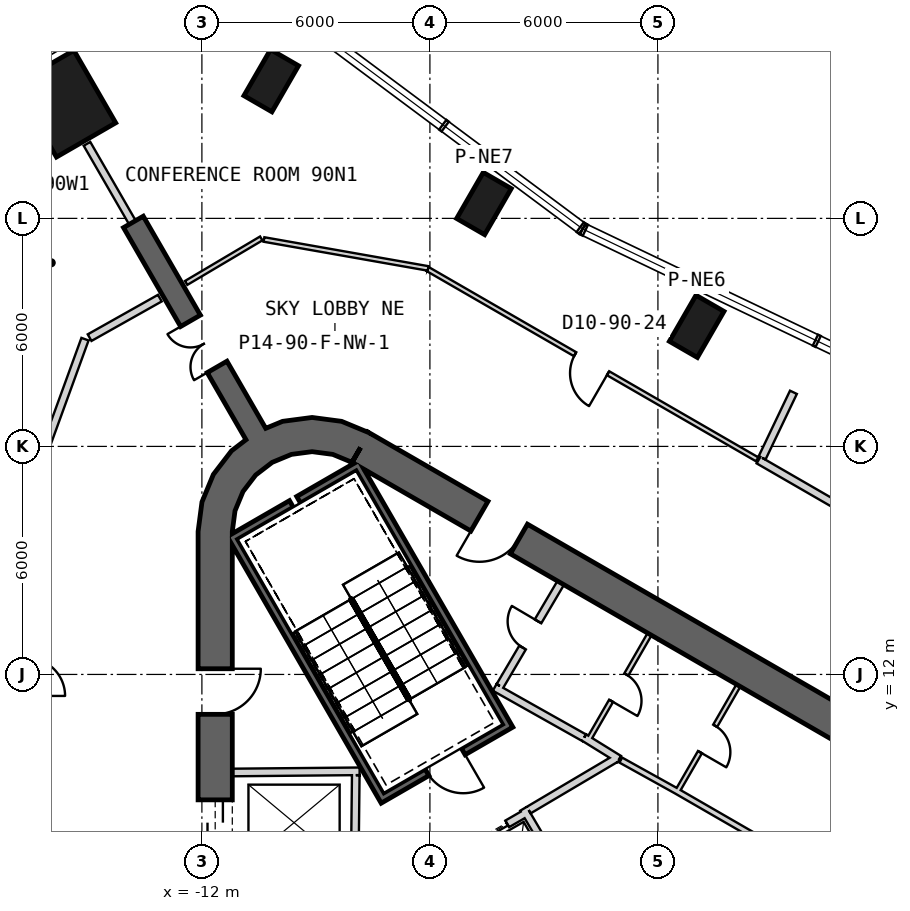
"""IFC4 building model, lengths in metres.
Left out: names, types, materials, properties, quantities, classifications, styles, units other than length and angle.
Written with IfcOpenShell. Run it as: python <this file> out.ifc"""

import sys

from ifc_helpers import new_model, si_unit, direction, frame, frame_2d, origin, origin_2d, place, context, subcontext, project, spatial, polyline, rectangle, outline, extrude, element, fill, save


model = new_model("IFC4")
c1 = context("Model", 3, precision=1e-05, world=origin(), true_north=direction((0.0, 1.0)))
c2 = subcontext(c1, "Body", "Model", "MODEL_VIEW")
j1 = project(units=[si_unit("LENGTHUNIT", "METRE"), si_unit("PLANEANGLEUNIT", "RADIAN")], contexts=[c1])
p1 = place(None, origin())
s1 = spatial("IfcSite", under=j1, at=p1, CompositionType="ELEMENT")
p2 = place(p1, origin())
s2 = spatial("IfcBuilding", under=s1, at=p2, CompositionType="ELEMENT")
p3 = place(p2, frame((0.0, 0.0, 392.3)))
s3 = spatial("IfcBuildingStorey", under=s2, at=p3, CompositionType="ELEMENT", Elevation=392.3)
p4 = place(p3, frame((-15.598, 27.016, 0.0), z_axis=(0.0, 0.0, 1.0), x_axis=(-0.5, 0.866025403784, 0.0)))
e1 = element("IfcColumn", 1, at=p4, inside=s3, PredefinedType="COLUMN", context=c2, shape_type="SweptSolid", body=[
    extrude(rectangle(XDim=2.2, YDim=1.8, at=origin_2d()), origin(), (0.0, 0.0, 1.0), 5.7),
])
for number, where, z_axis, x_axis in (
    (2, (1.02, 21.159, 0.0), (0.0, 0.0, 1.0), (0.5, 0.866, 0.0)),
    (3, (-4.578, 24.391, 0.0), (0.0, 0.0, 1.0), (0.5, 0.866, 0.0)),
    (4, (-10.176, 27.623, 0.0), (0.0, 0.0, 1.0), (0.5, 0.866, 0.0)),
):
    element("IfcColumn", number, at=place(p3, frame(where, z_axis=z_axis, x_axis=x_axis)), inside=s3, PredefinedType="COLUMN", context=c2, shape_type="SweptSolid", body=[
        extrude(rectangle(XDim=1.4, YDim=0.85, at=origin_2d()), origin(), (0.0, 0.0, 1.0), 5.7),
    ])
p5 = place(p3, frame((19.475, 2.208, 0.0), z_axis=(0.0, 0.0, 1.0), x_axis=(-0.866028369851, 0.499994862586, 0.0)))
e5 = element("IfcWall", 5, at=p5, inside=s3, PredefinedType="SHEAR", context=c2, shape_type="SweptSolid", body=[
    extrude(rectangle(XDim=31.523, YDim=0.9, at=frame_2d((15.762, 0.0))), origin(), (0.0, 0.0, 1.0), 6.0),
])
p6 = place(p5, frame((7.062, 0.0, 0.0)))
e6 = element("IfcOpeningElement", 6, at=p6, cuts=e5, PredefinedType="OPENING", context=c2, shape_type="SweptSolid", body=[
    extrude(rectangle(XDim=1.2, YDim=2.4, at=frame_2d((0.6, 1.2))), frame((0.0, 0.46, 0.0), z_axis=(0.0, -1.0, 0.0), x_axis=(1.0, 0.0, 0.0)), (0.0, 0.0, 1.0), 0.92),
])
p7 = place(p5, frame((3.612, 0.0, 0.0)))
e7 = element("IfcOpeningElement", 7, at=p7, cuts=e5, PredefinedType="OPENING", context=c2, shape_type="SweptSolid", body=[
    extrude(rectangle(XDim=1.2, YDim=2.4, at=frame_2d((0.6, 1.2))), frame((0.0, 0.46, 0.0), z_axis=(0.0, -1.0, 0.0), x_axis=(1.0, 0.0, 0.0)), (0.0, 0.0, 1.0), 0.92),
])
p8 = place(p5, frame((26.712, 0.0, 0.0)))
e8 = element("IfcOpeningElement", 8, at=p8, cuts=e5, PredefinedType="OPENING", context=c2, shape_type="SweptSolid", body=[
    extrude(rectangle(XDim=1.2, YDim=2.4, at=frame_2d((0.6, 1.2))), frame((0.0, 0.46, 0.0), z_axis=(0.0, -1.0, 0.0), x_axis=(1.0, 0.0, 0.0)), (0.0, 0.0, 1.0), 0.92),
])
p9 = place(p3, frame((-11.65, 15.762, 0.0), z_axis=(0.0, 0.0, 1.0), x_axis=(0.0, -1.0, 0.0)))
e9 = element("IfcWall", 9, at=p9, inside=s3, PredefinedType="SHEAR", context=c2, shape_type="SweptSolid", body=[
    extrude(rectangle(XDim=31.523, YDim=0.9, at=frame_2d((15.762, 0.0))), origin(), (0.0, 0.0, 1.0), 6.0),
])
p10 = place(p9, frame((7.062, 0.0, 0.0)))
e10 = element("IfcOpeningElement", 10, at=p10, cuts=e9, PredefinedType="OPENING", context=c2, shape_type="SweptSolid", body=[
    extrude(rectangle(XDim=1.2, YDim=2.4, at=frame_2d((0.6, 1.2))), frame((0.0, 0.46, 0.0), z_axis=(0.0, -1.0, 0.0), x_axis=(1.0, 0.0, 0.0)), (0.0, 0.0, 1.0), 0.92),
])
p11 = place(p9, frame((9.762, 0.0, 0.0)))
e11 = element("IfcOpeningElement", 11, at=p11, cuts=e9, PredefinedType="OPENING", context=c2, shape_type="SweptSolid", body=[
    extrude(rectangle(XDim=1.2, YDim=2.4, at=frame_2d((0.6, 1.2))), frame((0.0, 0.46, 0.0), z_axis=(0.0, -1.0, 0.0), x_axis=(1.0, 0.0, 0.0)), (0.0, 0.0, 1.0), 0.92),
])
p12 = place(p9, frame((12.462, 0.0, 0.0)))
e12 = element("IfcOpeningElement", 12, at=p12, cuts=e9, PredefinedType="OPENING", context=c2, shape_type="SweptSolid", body=[
    extrude(rectangle(XDim=1.2, YDim=2.4, at=frame_2d((0.6, 1.2))), frame((0.0, 0.46, 0.0), z_axis=(0.0, -1.0, 0.0), x_axis=(1.0, 0.0, 0.0)), (0.0, 0.0, 1.0), 0.92),
])
p13 = place(p9, frame((15.162, 0.0, 0.0)))
e13 = element("IfcOpeningElement", 13, at=p13, cuts=e9, PredefinedType="OPENING", context=c2, shape_type="SweptSolid", body=[
    extrude(rectangle(XDim=1.2, YDim=2.4, at=frame_2d((0.6, 1.2))), frame((0.0, 0.46, 0.0), z_axis=(0.0, -1.0, 0.0), x_axis=(1.0, 0.0, 0.0)), (0.0, 0.0, 1.0), 0.92),
])
p14 = place(p9, frame((17.862, 0.0, 0.0)))
e14 = element("IfcOpeningElement", 14, at=p14, cuts=e9, PredefinedType="OPENING", context=c2, shape_type="SweptSolid", body=[
    extrude(rectangle(XDim=1.2, YDim=2.4, at=frame_2d((0.6, 1.2))), frame((0.0, 0.46, 0.0), z_axis=(0.0, -1.0, 0.0), x_axis=(1.0, 0.0, 0.0)), (0.0, 0.0, 1.0), 0.92),
])
p15 = place(p9, frame((20.562, 0.0, 0.0)))
e15 = element("IfcOpeningElement", 15, at=p15, cuts=e9, PredefinedType="OPENING", context=c2, shape_type="SweptSolid", body=[
    extrude(rectangle(XDim=1.2, YDim=2.4, at=frame_2d((0.6, 1.2))), frame((0.0, 0.46, 0.0), z_axis=(0.0, -1.0, 0.0), x_axis=(1.0, 0.0, 0.0)), (0.0, 0.0, 1.0), 0.92),
])
p16 = place(p9, frame((23.262, 0.0, 0.0)))
e16 = element("IfcOpeningElement", 16, at=p16, cuts=e9, PredefinedType="OPENING", context=c2, shape_type="SweptSolid", body=[
    extrude(rectangle(XDim=1.2, YDim=2.4, at=frame_2d((0.6, 1.2))), frame((0.0, 0.46, 0.0), z_axis=(0.0, -1.0, 0.0), x_axis=(1.0, 0.0, 0.0)), (0.0, 0.0, 1.0), 0.92),
])
p17 = place(p9, frame((3.612, 0.0, 0.0)))
e17 = element("IfcOpeningElement", 17, at=p17, cuts=e9, PredefinedType="OPENING", context=c2, shape_type="SweptSolid", body=[
    extrude(rectangle(XDim=1.2, YDim=2.4, at=frame_2d((0.6, 1.2))), frame((0.0, 0.46, 0.0), z_axis=(0.0, -1.0, 0.0), x_axis=(1.0, 0.0, 0.0)), (0.0, 0.0, 1.0), 0.92),
])
p18 = place(p9, frame((26.712, 0.0, 0.0)))
e18 = element("IfcOpeningElement", 18, at=p18, cuts=e9, PredefinedType="OPENING", context=c2, shape_type="SweptSolid", body=[
    extrude(rectangle(XDim=1.2, YDim=2.4, at=frame_2d((0.6, 1.2))), frame((0.0, 0.46, 0.0), z_axis=(0.0, -1.0, 0.0), x_axis=(1.0, 0.0, 0.0)), (0.0, 0.0, 1.0), 0.92),
])
p19 = place(p3, origin())
e19 = element("IfcWall", 19, at=p19, inside=s3, PredefinedType="SHEAR", context=c2, shape_type="SweptSolid", body=[
    extrude(outline(polyline([(-7.6, 18.36), (-8.323, 18.659), (-9.1, 18.762), (-9.876, 18.659), (-10.6, 18.36), (-11.221, 17.883), (-11.698, 17.262), (-11.998, 16.538), (-12.1, 15.762), (-11.2, 15.762), (-11.128, 16.305), (-10.919, 16.812), (-10.585, 17.247), (-10.15, 17.58), (-9.644, 17.79), (-9.1, 17.862), (-8.556, 17.79), (-8.05, 17.58), (-7.6, 18.36)])), origin(), (0.0, 0.0, 1.0), 6.0),
])
p20 = place(p3, frame((-10.575, 18.316, 0.0), z_axis=(0.0, 0.0, 1.0), x_axis=(-0.500011655475, 0.866018674388, 0.0)))
e20 = element("IfcWall", 20, at=p20, inside=s3, PredefinedType="SHEAR", context=c2, shape_type="SweptSolid", body=[
    extrude(rectangle(XDim=6.455, YDim=0.6, at=frame_2d((3.228, 0.0))), origin(), (0.0, 0.0, 1.0), 6.0),
])
p21 = place(p20, frame((2.05, 0.0, 0.0)))
e21 = element("IfcOpeningElement", 21, at=p21, cuts=e20, PredefinedType="OPENING", context=c2, shape_type="SweptSolid", body=[
    extrude(rectangle(XDim=1.4, YDim=2.4, at=frame_2d((0.7, 1.2))), frame((0.0, 0.31, 0.0), z_axis=(0.0, -1.0, 0.0), x_axis=(1.0, 0.0, 0.0)), (0.0, 0.0, 1.0), 0.62),
])
p22 = place(p3, frame((-11.2, 9.42, 0.0), z_axis=(0.0, 0.0, 1.0), x_axis=(0.999957167047, 0.009255488683, 0.0)))
e22 = element("IfcWall", 22, at=p22, inside=s3, PredefinedType="PLUMBINGWALL", context=c2, shape_type="SweptSolid", body=[
    extrude(rectangle(XDim=3.35, YDim=0.2, at=frame_2d((1.675, 0.0))), origin(), (0.0, 0.0, 1.0), 5.7),
])
p23 = place(p3, frame((-7.951, 9.35, 0.0), z_axis=(0.0, 0.0, 1.0), x_axis=(-0.011120469654, -0.999938165666, 0.0)))
e23 = element("IfcWall", 23, at=p23, inside=s3, PredefinedType="PLUMBINGWALL", context=c2, shape_type="SweptSolid", body=[
    extrude(rectangle(XDim=2.7, YDim=0.2, at=frame_2d((1.35, 0.0))), origin(), (0.0, 0.0, 1.0), 5.7),
])
p24 = place(p3, frame((-11.245, 15.678, -0.35), z_axis=(0.0, 0.0, 1.0), x_axis=(0.499977274689, -0.866038523851, 0.0)))
e24 = element("IfcWall", 24, at=p24, inside=s3, PredefinedType="SHEAR", context=c2, shape_type="SweptSolid", body=[
    extrude(rectangle(XDim=8.1, YDim=0.2, at=frame_2d((4.05, 0.0))), origin(), (0.0, 0.0, 1.0), 6.05),
])
p25 = place(p3, frame((-7.818, 17.541, -0.35), z_axis=(0.0, 0.0, 1.0), x_axis=(-0.866088799389, -0.499890179513, 0.0)))
e25 = element("IfcWall", 25, at=p25, inside=s3, PredefinedType="SHEAR", context=c2, shape_type="SweptSolid", body=[
    extrude(rectangle(XDim=1.89, YDim=0.2, at=frame_2d((0.945, 0.0))), origin(), (0.0, 0.0, 1.0), 6.05),
])
p26 = place(p3, frame((-9.645, 16.486, -0.35), z_axis=(0.0, 0.0, 1.0), x_axis=(-0.866038843867, -0.499976720371, 0.0)))
e26 = element("IfcWall", 26, at=p26, inside=s3, PredefinedType="SHEAR", context=c2, shape_type="SweptSolid", body=[
    extrude(rectangle(XDim=1.69, YDim=0.2, at=frame_2d((0.845, 0.0))), origin(), (0.0, 0.0, 1.0), 6.05),
])
p27 = place(p3, frame((-7.854, 17.405, -0.35), z_axis=(0.0, 0.0, 1.0), x_axis=(0.499997992926, -0.866026562566, 0.0)))
e27 = element("IfcWall", 27, at=p27, inside=s3, PredefinedType="SHEAR", context=c2, shape_type="SweptSolid", body=[
    extrude(rectangle(XDim=7.9, YDim=0.2, at=frame_2d((3.95, 0.0))), origin(), (0.0, 0.0, 1.0), 6.05),
])
p28 = place(p3, frame((-7.159, 8.8, -0.35), z_axis=(0.0, 0.0, 1.0), x_axis=(0.866047807691, 0.499961193289, 0.0)))
e28 = element("IfcWall", 28, at=p28, inside=s3, PredefinedType="SHEAR", context=c2, shape_type="SweptSolid", body=[
    extrude(rectangle(XDim=3.6, YDim=0.2, at=frame_2d((1.8, 0.0))), origin(), (0.0, 0.0, 1.0), 6.05),
])
p29 = place(p28, frame((1.25, 0.0, 0.35)))
e29 = element("IfcOpeningElement", 29, at=p29, cuts=e28, PredefinedType="OPENING", context=c2, shape_type="SweptSolid", body=[
    extrude(rectangle(XDim=1.1, YDim=2.1, at=frame_2d((0.55, 1.05))), frame((0.0, 0.11, 0.0), z_axis=(0.0, -1.0, 0.0), x_axis=(1.0, 0.0, 0.0)), (0.0, 0.0, 1.0), 0.22),
])
p30 = place(p3, frame((-5.524, 7.168, 0.0), z_axis=(0.0, 0.0, 1.0), x_axis=(0.866024647952, 0.500001309137, 0.0)))
e30 = element("IfcWall", 30, at=p30, inside=s3, PredefinedType="PLUMBINGWALL", context=c2, shape_type="SweptSolid", body=[
    extrude(rectangle(XDim=2.4, YDim=0.2, at=frame_2d((1.2, 0.0))), origin(), (0.0, 0.0, 1.0), 5.7),
])
p31 = place(p30, frame((0.6, 0.0, 0.0)))
e31 = element("IfcOpeningElement", 31, at=p31, cuts=e30, PredefinedType="OPENING", context=c2, shape_type="SweptSolid", body=[
    extrude(rectangle(XDim=1.2, YDim=2.4, at=frame_2d((0.6, 1.2))), frame((0.0, 0.11, 0.0), z_axis=(0.0, -1.0, 0.0), x_axis=(1.0, 0.0, 0.0)), (0.0, 0.0, 1.0), 0.22),
])
p32 = place(p3, frame((-3.538, 8.465, 0.0), z_axis=(0.0, 0.0, 1.0), x_axis=(0.508647062354, -0.860975125052, 0.0)))
e32 = element("IfcWall", 32, at=p32, inside=s3, PredefinedType="PLUMBINGWALL", context=c2, shape_type="SweptSolid", body=[
    extrude(rectangle(XDim=3.1, YDim=0.2, at=frame_2d((1.55, 0.0))), origin(), (0.0, 0.0, 1.0), 5.7),
])
p33 = place(p3, frame((2.119, 11.709, 0.0), z_axis=(0.0, 0.0, 1.0), x_axis=(-0.500017246033, -0.866015446554, 0.0)))
e33 = element("IfcWall", 33, at=p33, inside=s3, PredefinedType="PARTITIONING", context=c2, shape_type="SweptSolid", body=[
    extrude(rectangle(XDim=3.25, YDim=0.12, at=frame_2d((1.625, 0.0))), origin(), (0.0, 0.0, 1.0), 5.7),
])
p34 = place(p33, frame((1.225, 0.0, 0.0)))
e34 = element("IfcOpeningElement", 34, at=p34, cuts=e33, PredefinedType="OPENING", context=c2, shape_type="SweptSolid", body=[
    extrude(rectangle(XDim=0.8, YDim=2.1, at=frame_2d((0.4, 1.05))), frame((0.0, 0.07, 0.0), z_axis=(0.0, -1.0, 0.0), x_axis=(1.0, 0.0, 0.0)), (0.0, 0.0, 1.0), 0.14),
])
p35 = place(p3, frame((5.159, 6.236, 0.0), z_axis=(0.0, 0.0, 1.0), x_axis=(-0.866028230842, 0.499995103361, 0.0)))
e35 = element("IfcWall", 35, at=p35, inside=s3, PredefinedType="PLUMBINGWALL", context=c2, shape_type="SweptSolid", body=[
    extrude(rectangle(XDim=5.4, YDim=0.15, at=frame_2d((2.7, 0.0))), origin(), (0.0, 0.0, 1.0), 5.7),
])
p36 = place(p35, frame((2.3, 0.0, 0.0)))
e36 = element("IfcOpeningElement", 36, at=p36, cuts=e35, PredefinedType="OPENING", context=c2, shape_type="SweptSolid", body=[
    extrude(rectangle(XDim=0.8, YDim=2.1, at=frame_2d((0.4, 1.05))), frame((0.0, 0.085, 0.0), z_axis=(0.0, -1.0, 0.0), x_axis=(1.0, 0.0, 0.0)), (0.0, 0.0, 1.0), 0.17),
])
p37 = place(p3, frame((-0.22, 13.06, 0.0), z_axis=(0.0, 0.0, 1.0), x_axis=(-0.499984717929, -0.866034226713, 0.0)))
e37 = element("IfcWall", 37, at=p37, inside=s3, PredefinedType="PARTITIONING", context=c2, shape_type="SweptSolid", body=[
    extrude(rectangle(XDim=3.25, YDim=0.12, at=frame_2d((1.625, 0.0))), origin(), (0.0, 0.0, 1.0), 5.7),
])
p38 = place(p37, frame((1.225, 0.0, 0.0)))
e38 = element("IfcOpeningElement", 38, at=p38, cuts=e37, PredefinedType="OPENING", context=c2, shape_type="SweptSolid", body=[
    extrude(rectangle(XDim=0.8, YDim=2.1, at=frame_2d((0.4, 1.05))), frame((0.0, 0.07, 0.0), z_axis=(0.0, -1.0, 0.0), x_axis=(1.0, 0.0, 0.0)), (0.0, 0.0, 1.0), 0.14),
])
p39 = place(p3, frame((-1.941, 10.339, 0.0), z_axis=(0.0, 0.0, 1.0), x_axis=(0.850216889117, -0.526432561171, 0.0)))
e39 = element("IfcWall", 39, at=p39, inside=s3, PredefinedType="PARTITIONING", context=c2, shape_type="SweptSolid", body=[
    extrude(rectangle(XDim=1.078, YDim=0.2, at=frame_2d((0.539, 0.0))), origin(), (0.0, 0.0, 1.0), 5.7),
])
p40 = place(p3, frame((0.483, 8.936, 0.0), z_axis=(0.0, 0.0, 1.0), x_axis=(-0.874315691004, 0.485357674776, 0.0)))
e40 = element("IfcWall", 40, at=p40, inside=s3, PredefinedType="PLUMBINGWALL", context=c2, shape_type="SweptSolid", body=[
    extrude(rectangle(XDim=1.671, YDim=0.15, at=frame_2d((0.836, 0.0))), origin(), (0.0, 0.0, 1.0), 5.7),
])
p41 = place(p3, frame((-4.296, 11.659, 0.0), z_axis=(0.0, 0.0, 1.0), x_axis=(0.871534483978, -0.490334215854, 0.0)))
e41 = element("IfcWall", 41, at=p41, inside=s3, PredefinedType="PARTITIONING", context=c2, shape_type="SweptSolid", body=[
    extrude(rectangle(XDim=2.7, YDim=0.2, at=frame_2d((1.35, 0.0))), origin(), (0.0, 0.0, 1.0), 5.7),
])
p42 = place(p3, frame((-2.558, 14.409, 0.0), z_axis=(0.0, 0.0, 1.0), x_axis=(-0.508018930956, -0.861345903683, 0.0)))
e42 = element("IfcWall", 42, at=p42, inside=s3, PredefinedType="PARTITIONING", context=c2, shape_type="SweptSolid", body=[
    extrude(rectangle(XDim=3.15, YDim=0.2, at=frame_2d((1.575, 0.0))), origin(), (0.0, 0.0, 1.0), 5.7),
])
p43 = place(p42, frame((1.175, 0.0, 0.0)))
e43 = element("IfcOpeningElement", 43, at=p43, cuts=e42, PredefinedType="OPENING", context=c2, shape_type="SweptSolid", body=[
    extrude(rectangle(XDim=0.8, YDim=2.1, at=frame_2d((0.4, 1.05))), frame((0.0, 0.11, 0.0), z_axis=(0.0, -1.0, 0.0), x_axis=(1.0, 0.0, 0.0)), (0.0, 0.0, 1.0), 0.22),
])
p44 = place(p3, frame((-1.056, 9.818, 0.0), z_axis=(0.0, 0.0, 1.0), x_axis=(-0.860599924646, -0.509281621207, 0.0)))
e44 = element("IfcWall", 44, at=p44, inside=s3, PredefinedType="PARTITIONING", context=c2, shape_type="SweptSolid", body=[
    extrude(rectangle(XDim=2.725, YDim=0.2, at=frame_2d((1.362, 0.0))), origin(), (0.0, 0.0, 1.0), 5.7),
])
p45 = place(p3, frame((-15.076, 20.822, 0.0), z_axis=(0.0, 0.0, 1.0), x_axis=(-0.342071567328, -0.939673902386, 0.0)))
e45 = element("IfcWall", 45, at=p45, inside=s3, PredefinedType="PARTITIONING", context=c2, shape_type="SweptSolid", body=[
    extrude(rectangle(XDim=4.356, YDim=0.2, at=frame_2d((2.178, 0.0))), origin(), (0.0, 0.0, 1.0), 5.07),
])
p46 = place(p3, frame((-13.107, 21.902, 0.0), z_axis=(0.0, 0.0, 1.0), x_axis=(-0.871581686769, -0.490250306772, 0.0)))
e46 = element("IfcWall", 46, at=p46, inside=s3, PredefinedType="PARTITIONING", context=c2, shape_type="SweptSolid", body=[
    extrude(rectangle(XDim=2.12, YDim=0.2, at=frame_2d((1.06, 0.0))), origin(), (0.0, 0.0, 1.0), 5.7),
])
p47 = place(p3, frame((-15.024, 25.962, 0.0), z_axis=(0.0, 0.0, 1.0), x_axis=(0.500037706602, -0.866003632773, 0.0)))
e47 = element("IfcWall", 47, at=p47, inside=s3, PredefinedType="PARTITIONING", context=c2, shape_type="SweptSolid", body=[
    extrude(rectangle(XDim=2.391, YDim=0.2, at=frame_2d((1.195, 0.0))), origin(), (0.0, 0.0, 1.0), 5.27),
])
p48 = place(p3, frame((22.792, 6.009, 0.0), z_axis=(0.0, 0.0, 1.0), x_axis=(-0.866028288731, 0.499995003092, 0.0)))
e48 = element("IfcWall", 48, at=p48, inside=s3, PredefinedType="PARTITIONING", context=c2, shape_type="SweptSolid", body=[
    extrude(rectangle(XDim=23.262, YDim=0.2, at=frame_2d((11.631, 0.0))), origin(), (0.0, 0.0, 1.0), 5.07),
])
p49 = place(p48, frame((11.1, 0.0, 0.0)))
e49 = element("IfcOpeningElement", 49, at=p49, cuts=e48, PredefinedType="OPENING", context=c2, shape_type="SweptSolid", body=[
    extrude(rectangle(XDim=1.0, YDim=2.1, at=frame_2d((0.5, 1.05))), frame((0.0, 0.11, 0.0), z_axis=(0.0, -1.0, 0.0), x_axis=(1.0, 0.0, 0.0)), (0.0, 0.0, 1.0), 0.22),
])
p50 = place(p3, frame((-10.438, 23.472, 0.0), z_axis=(0.0, 0.0, 1.0), x_axis=(-0.860350247392, -0.509703297824, 0.0)))
e50 = element("IfcWall", 50, at=p50, inside=s3, PredefinedType="PARTITIONING", context=c2, shape_type="SweptSolid", body=[
    extrude(rectangle(XDim=2.296, YDim=0.12, at=frame_2d((1.148, 0.0))), origin(), (0.0, 0.0, 1.0), 5.7),
])
p51 = place(p3, frame((-6.047, 22.683, 0.0), z_axis=(0.0, 0.0, 1.0), x_axis=(-0.984807082904, 0.173651977996, 0.0)))
e51 = element("IfcWall", 51, at=p51, inside=s3, PredefinedType="PARTITIONING", context=c2, shape_type="SweptSolid", body=[
    extrude(rectangle(XDim=4.386, YDim=0.12, at=frame_2d((2.193, 0.0))), origin(), (0.0, 0.0, 1.0), 5.07),
])
p52 = place(p3, frame((2.612, 17.66, 0.0), z_axis=(0.0, 0.0, 1.0), x_axis=(-0.866027543104, 0.499996294571, 0.0)))
e52 = element("IfcWall", 52, at=p52, inside=s3, PredefinedType="PARTITIONING", context=c2, shape_type="SweptSolid", body=[
    extrude(rectangle(XDim=10.007, YDim=0.12, at=frame_2d((5.003, 0.0))), origin(), (0.0, 0.0, 1.0), 5.07),
])
p53 = place(p52, frame((4.532, 0.0, 0.0)))
e53 = element("IfcOpeningElement", 53, at=p53, cuts=e52, PredefinedType="OPENING", context=c2, shape_type="SweptSolid", body=[
    extrude(rectangle(XDim=1.0, YDim=2.1, at=frame_2d((0.5, 1.05))), frame((0.0, 0.07, 0.0), z_axis=(0.0, -1.0, 0.0), x_axis=(1.0, 0.0, 0.0)), (0.0, 0.0, 1.0), 0.14),
])
p54 = place(p3, frame((3.566, 19.423, 0.0), z_axis=(0.0, 0.0, 1.0), x_axis=(-0.431188597571, -0.902261820829, 0.0)))
e54 = element("IfcWall", 54, at=p54, inside=s3, PredefinedType="PARTITIONING", context=c2, shape_type="SweptSolid", body=[
    extrude(rectangle(XDim=1.91, YDim=0.2, at=frame_2d((0.955, 0.0))), origin(), (0.0, 0.0, 1.0), 4.07),
])
p55 = place(p29, origin())
e55 = element("IfcDoor", 55, at=p55, inside=s3, OperationType="SINGLE_SWING_RIGHT", PredefinedType="USERDEFINED", context=c2, shape_type="SweptSolid", body=[
    extrude(rectangle(XDim=1.1, YDim=2.1, at=frame_2d((0.55, 1.05))), frame((0.0, 0.025, 0.0), z_axis=(0.0, -1.0, 0.0), x_axis=(1.0, 0.0, 0.0)), (0.0, 0.0, 1.0), 0.05),
])
fill(e29, e55)
p56 = place(p31, origin())
e56 = element("IfcDoor", 56, at=p56, inside=s3, OperationType="SLIDING_TO_LEFT", PredefinedType="USERDEFINED", context=c2, shape_type="SweptSolid", body=[
    extrude(rectangle(XDim=1.2, YDim=2.4, at=frame_2d((0.6, 1.2))), frame((0.0, 0.025, 0.0), z_axis=(0.0, -1.0, 0.0), x_axis=(1.0, 0.0, 0.0)), (0.0, 0.0, 1.0), 0.05),
])
fill(e31, e56)
p57 = place(p34, origin())
e57 = element("IfcDoor", 57, at=p57, inside=s3, OperationType="SINGLE_SWING_RIGHT", PredefinedType="USERDEFINED", context=c2, shape_type="SweptSolid", body=[
    extrude(rectangle(XDim=0.8, YDim=2.1, at=frame_2d((0.4, 1.05))), frame((0.0, 0.025, 0.0), z_axis=(0.0, -1.0, 0.0), x_axis=(1.0, 0.0, 0.0)), (0.0, 0.0, 1.0), 0.05),
])
fill(e34, e57)
p58 = place(p43, origin())
e58 = element("IfcDoor", 58, at=p58, inside=s3, OperationType="SINGLE_SWING_LEFT", PredefinedType="USERDEFINED", context=c2, shape_type="SweptSolid", body=[
    extrude(rectangle(XDim=0.8, YDim=2.1, at=frame_2d((0.4, 1.05))), frame((0.0, 0.025, 0.0), z_axis=(0.0, -1.0, 0.0), x_axis=(1.0, 0.0, 0.0)), (0.0, 0.0, 1.0), 0.05),
])
fill(e43, e58)
p59 = place(p53, origin())
e59 = element("IfcDoor", 59, at=p59, inside=s3, OperationType="SINGLE_SWING_LEFT", PredefinedType="NOTDEFINED", context=c2, shape_type="SweptSolid", body=[
    extrude(rectangle(XDim=1.0, YDim=2.1, at=frame_2d((0.5, 1.05))), frame((0.0, 0.025, 0.0), z_axis=(0.0, -1.0, 0.0), x_axis=(1.0, 0.0, 0.0)), (0.0, 0.0, 1.0), 0.05),
])
fill(e53, e59)
p60 = place(p38, origin())
e60 = element("IfcDoor", 60, at=p60, inside=s3, OperationType="SINGLE_SWING_RIGHT", PredefinedType="USERDEFINED", context=c2, shape_type="SweptSolid", body=[
    extrude(rectangle(XDim=0.8, YDim=2.1, at=frame_2d((0.4, 1.05))), frame((0.0, 0.025, 0.0), z_axis=(0.0, -1.0, 0.0), x_axis=(1.0, 0.0, 0.0)), (0.0, 0.0, 1.0), 0.05),
])
fill(e38, e60)
p61 = place(p10, origin())
e61 = element("IfcDoor", 61, at=p61, inside=s3, OperationType="SLIDING_TO_LEFT", PredefinedType="USERDEFINED", context=c2, shape_type="SweptSolid", body=[
    extrude(rectangle(XDim=1.2, YDim=2.4, at=frame_2d((0.6, 1.2))), frame((0.0, 0.025, 0.0), z_axis=(0.0, -1.0, 0.0), x_axis=(1.0, 0.0, 0.0)), (0.0, 0.0, 1.0), 0.05),
])
fill(e10, e61)
p62 = place(p8, origin())
e62 = element("IfcDoor", 62, at=p62, inside=s3, OperationType="SINGLE_SWING_RIGHT", PredefinedType="USERDEFINED", context=c2, shape_type="SweptSolid", body=[
    extrude(rectangle(XDim=1.2, YDim=2.4, at=frame_2d((0.6, 1.2))), frame((0.0, 0.025, 0.0), z_axis=(0.0, -1.0, 0.0), x_axis=(1.0, 0.0, 0.0)), (0.0, 0.0, 1.0), 0.05),
])
fill(e8, e62)
p63 = place(p17, origin())
e63 = element("IfcDoor", 63, at=p63, inside=s3, OperationType="SINGLE_SWING_LEFT", PredefinedType="USERDEFINED", context=c2, shape_type="SweptSolid", body=[
    extrude(rectangle(XDim=1.2, YDim=2.4, at=frame_2d((0.6, 1.2))), frame((0.0, 0.025, 0.0), z_axis=(0.0, -1.0, 0.0), x_axis=(1.0, 0.0, 0.0)), (0.0, 0.0, 1.0), 0.05),
])
fill(e17, e63)
p64 = place(p21, origin())
e64 = element("IfcDoor", 64, at=p64, inside=s3, OperationType="DOUBLE_DOOR_SINGLE_SWING", PredefinedType="NOTDEFINED", context=c2, shape_type="SweptSolid", body=[
    extrude(rectangle(XDim=1.4, YDim=2.4, at=frame_2d((0.7, 1.2))), frame((0.0, 0.025, 0.0), z_axis=(0.0, -1.0, 0.0), x_axis=(1.0, 0.0, 0.0)), (0.0, 0.0, 1.0), 0.05),
])
fill(e21, e64)
save(model, sys.argv[1])
